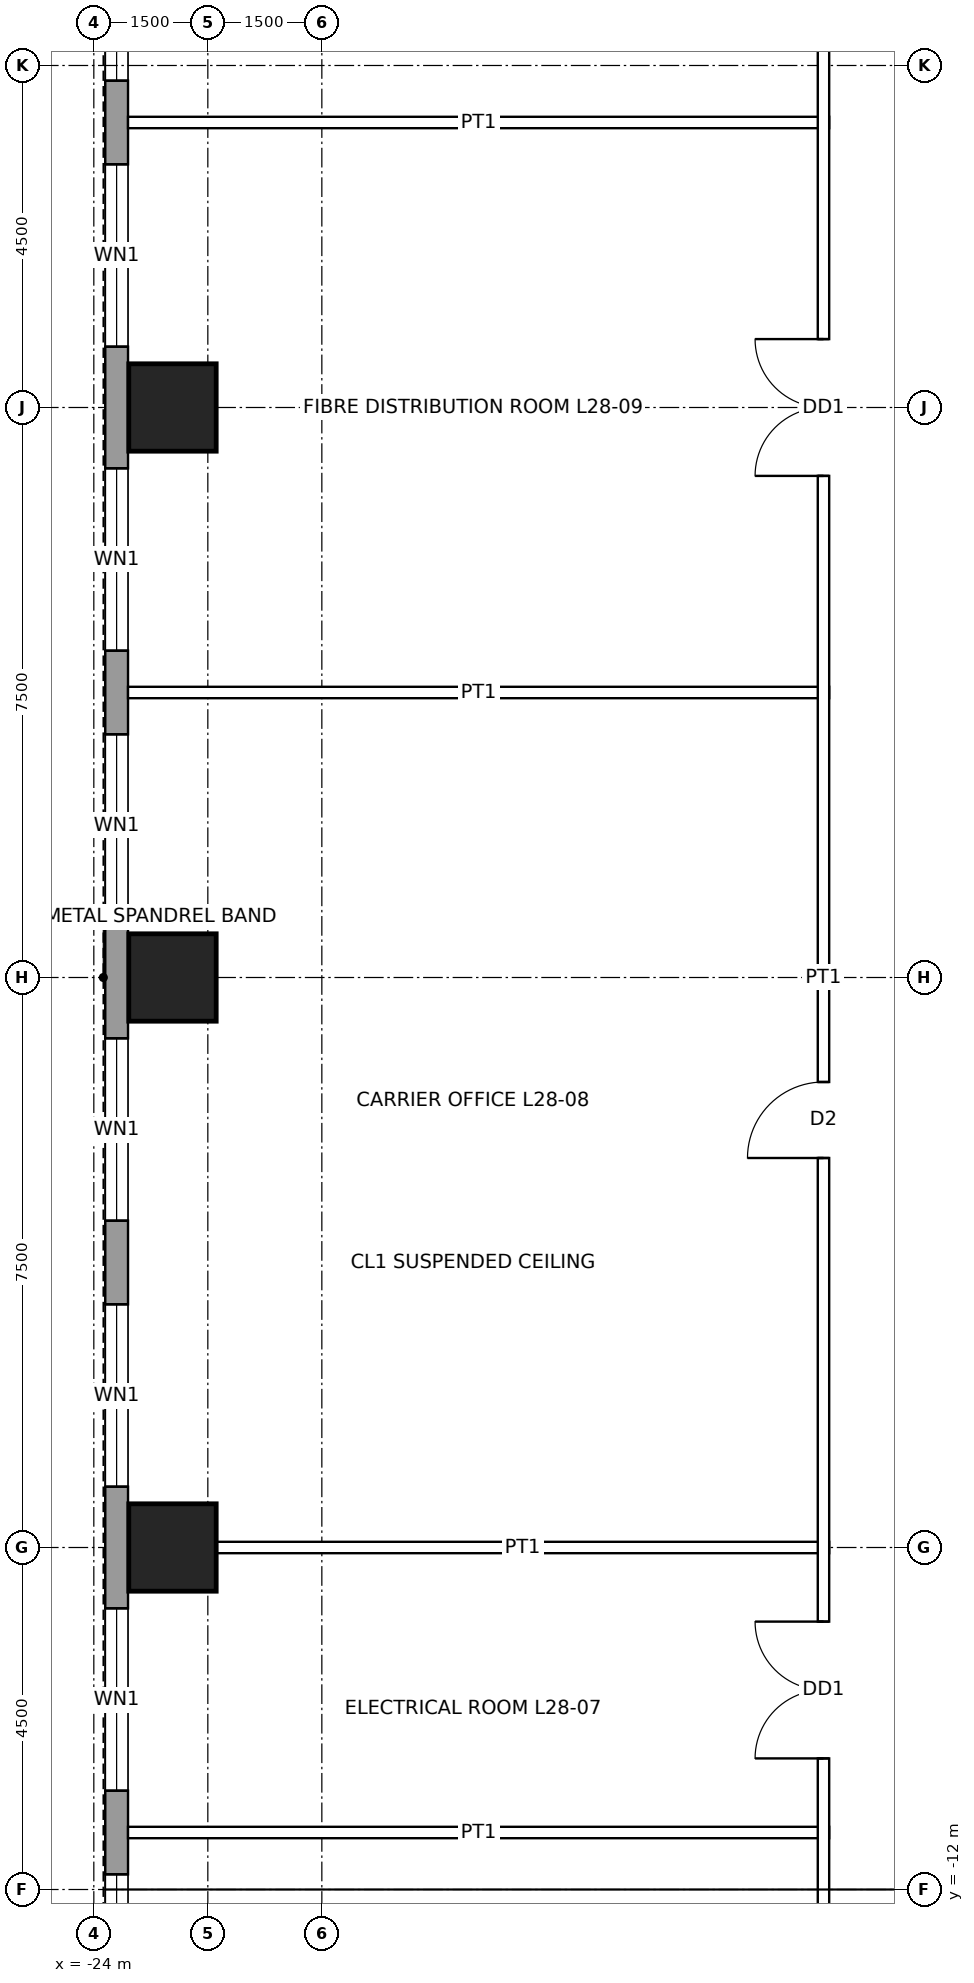
"""IFC4 building model, lengths in metres.
Left out: names, types, materials, properties, quantities, classifications, styles, units other than length and angle.
Written with IfcOpenShell. Run it as: python <this file> out.ifc"""

import sys

from ifc_helpers import new_model, si_unit, direction, frame, frame_2d, origin, origin_2d, place, context, subcontext, project, spatial, rectangle, hollow_rectangle, extrude, element, fill, save


model = new_model("IFC4")
c1 = context("Model", 3, precision=1e-05, world=origin(), true_north=direction((0.0, 1.0)))
c2 = subcontext(c1, "Body", "Model", "MODEL_VIEW")
j1 = project(units=[si_unit("LENGTHUNIT", "METRE"), si_unit("PLANEANGLEUNIT", "RADIAN")], contexts=[c1])
p1 = place(None, origin())
s1 = spatial("IfcSite", under=j1, at=p1, CompositionType="ELEMENT")
p2 = place(p1, origin())
s2 = spatial("IfcBuilding", under=s1, at=p2, CompositionType="ELEMENT")
p3 = place(p2, frame((0.0, 0.0, 140.4)))
s3 = spatial("IfcBuildingStorey", under=s2, at=p3, CompositionType="ELEMENT", Elevation=140.4)
for number, where, z_axis, x_axis in (
    (1, (-22.965, -7.5, 0.0), (0.0, 0.0, 1.0), (1.0, 0.0, 0.0)),
    (2, (-22.965, 0.0, 0.0), (0.0, 0.0, 1.0), (1.0, 0.0, 0.0)),
    (3, (-22.965, 7.5, 0.0), (0.0, 0.0, 1.0), (1.0, 0.0, 0.0)),
):
    element("IfcColumn", number, at=place(p3, frame(where, z_axis=z_axis, x_axis=x_axis)), inside=s3, PredefinedType="COLUMN", context=c2, shape_type="SweptSolid", body=[
        extrude(hollow_rectangle(XDim=1.15, YDim=1.15, WallThickness=0.075, at=origin_2d()), origin(), (0.0, 0.0, 1.0), 4.5),
    ])
p4 = place(p3, frame((-23.7, -16.2, 0.0), z_axis=(0.0, 0.0, 1.0), x_axis=(0.0, 1.0, 0.0)))
e4 = element("IfcWall", 4, at=p4, inside=s3, PredefinedType="SOLIDWALL", context=c2, shape_type="SweptSolid", body=[
    extrude(rectangle(XDim=32.4, YDim=0.3, at=frame_2d((16.2, 0.0))), origin(), (0.0, 0.0, 1.0), 4.3),
])
p5 = place(p4, frame((2.0, 0.0, 1.0)))
e5 = element("IfcOpeningElement", 5, at=p5, cuts=e4, PredefinedType="OPENING", context=c2, shape_type="SweptSolid", body=[
    extrude(rectangle(XDim=2.4, YDim=1.2, at=frame_2d((1.2, 0.6))), frame((0.0, 0.16, 0.0), z_axis=(0.0, -1.0, 0.0), x_axis=(1.0, 0.0, 0.0)), (0.0, 0.0, 1.0), 0.32),
])
p6 = place(p4, frame((5.5, 0.0, 1.0)))
e6 = element("IfcOpeningElement", 6, at=p6, cuts=e4, PredefinedType="OPENING", context=c2, shape_type="SweptSolid", body=[
    extrude(rectangle(XDim=2.4, YDim=1.2, at=frame_2d((1.2, 0.6))), frame((0.0, 0.16, 0.0), z_axis=(0.0, -1.0, 0.0), x_axis=(1.0, 0.0, 0.0)), (0.0, 0.0, 1.0), 0.32),
])
p7 = place(p4, frame((9.5, 0.0, 1.0)))
e7 = element("IfcOpeningElement", 7, at=p7, cuts=e4, PredefinedType="OPENING", context=c2, shape_type="SweptSolid", body=[
    extrude(rectangle(XDim=2.4, YDim=1.2, at=frame_2d((1.2, 0.6))), frame((0.0, 0.16, 0.0), z_axis=(0.0, -1.0, 0.0), x_axis=(1.0, 0.0, 0.0)), (0.0, 0.0, 1.0), 0.32),
])
p8 = place(p4, frame((13.0, 0.0, 1.0)))
e8 = element("IfcOpeningElement", 8, at=p8, cuts=e4, PredefinedType="OPENING", context=c2, shape_type="SweptSolid", body=[
    extrude(rectangle(XDim=2.4, YDim=1.2, at=frame_2d((1.2, 0.6))), frame((0.0, 0.16, 0.0), z_axis=(0.0, -1.0, 0.0), x_axis=(1.0, 0.0, 0.0)), (0.0, 0.0, 1.0), 0.32),
])
p9 = place(p4, frame((17.0, 0.0, 1.0)))
e9 = element("IfcOpeningElement", 9, at=p9, cuts=e4, PredefinedType="OPENING", context=c2, shape_type="SweptSolid", body=[
    extrude(rectangle(XDim=2.4, YDim=1.2, at=frame_2d((1.2, 0.6))), frame((0.0, 0.16, 0.0), z_axis=(0.0, -1.0, 0.0), x_axis=(1.0, 0.0, 0.0)), (0.0, 0.0, 1.0), 0.32),
])
p10 = place(p4, frame((20.5, 0.0, 1.0)))
e10 = element("IfcOpeningElement", 10, at=p10, cuts=e4, PredefinedType="OPENING", context=c2, shape_type="SweptSolid", body=[
    extrude(rectangle(XDim=2.4, YDim=1.2, at=frame_2d((1.2, 0.6))), frame((0.0, 0.16, 0.0), z_axis=(0.0, -1.0, 0.0), x_axis=(1.0, 0.0, 0.0)), (0.0, 0.0, 1.0), 0.32),
])
p11 = place(p4, frame((24.5, 0.0, 1.0)))
e11 = element("IfcOpeningElement", 11, at=p11, cuts=e4, PredefinedType="OPENING", context=c2, shape_type="SweptSolid", body=[
    extrude(rectangle(XDim=2.4, YDim=1.2, at=frame_2d((1.2, 0.6))), frame((0.0, 0.16, 0.0), z_axis=(0.0, -1.0, 0.0), x_axis=(1.0, 0.0, 0.0)), (0.0, 0.0, 1.0), 0.32),
])
p12 = place(p4, frame((28.0, 0.0, 1.0)))
e12 = element("IfcOpeningElement", 12, at=p12, cuts=e4, PredefinedType="OPENING", context=c2, shape_type="SweptSolid", body=[
    extrude(rectangle(XDim=2.4, YDim=1.2, at=frame_2d((1.2, 0.6))), frame((0.0, 0.16, 0.0), z_axis=(0.0, -1.0, 0.0), x_axis=(1.0, 0.0, 0.0)), (0.0, 0.0, 1.0), 0.32),
])
p13 = place(p3, frame((-23.55, -11.25, 0.0), z_axis=(0.0, 0.0, 1.0), x_axis=(1.0, 0.0, 0.0)))
e13 = element("IfcWall", 13, at=p13, inside=s3, PredefinedType="PARTITIONING", context=c2, shape_type="SweptSolid", body=[
    extrude(rectangle(XDim=9.225, YDim=0.15, at=frame_2d((4.613, 0.0))), origin(), (0.0, 0.0, 1.0), 3.431),
])
p14 = place(p3, frame((-22.39, -7.5, 0.0), z_axis=(0.0, 0.0, 1.0), x_axis=(1.0, 0.0, 0.0)))
e14 = element("IfcWall", 14, at=p14, inside=s3, PredefinedType="PARTITIONING", context=c2, shape_type="SweptSolid", body=[
    extrude(rectangle(XDim=8.065, YDim=0.15, at=frame_2d((4.032, 0.0))), origin(), (0.0, 0.0, 1.0), 3.431),
])
for number, where, z_axis, x_axis in (
    (15, (-23.55, 3.75, 0.0), (0.0, 0.0, 1.0), (1.0, 0.0, 0.0)),
    (16, (-23.55, 11.25, 0.0), (0.0, 0.0, 1.0), (1.0, 0.0, 0.0)),
):
    element("IfcWall", number, at=place(p3, frame(where, z_axis=z_axis, x_axis=x_axis)), inside=s3, PredefinedType="PARTITIONING", context=c2, shape_type="SweptSolid", body=[
        extrude(rectangle(XDim=9.225, YDim=0.15, at=frame_2d((4.613, 0.0))), origin(), (0.0, 0.0, 1.0), 3.431),
    ])
p15 = place(p3, frame((-14.4, -14.475, 0.0), z_axis=(0.0, 0.0, 1.0), x_axis=(0.0, 1.0, 0.0)))
e17 = element("IfcWall", 17, at=p15, inside=s3, PredefinedType="PARTITIONING", context=c2, shape_type="SweptSolid", body=[
    extrude(rectangle(XDim=28.95, YDim=0.15, at=frame_2d((14.475, 0.0))), origin(), (0.0, 0.0, 1.0), 4.3),
])
p16 = place(p15, frame((4.2, 0.0, 0.0)))
e18 = element("IfcOpeningElement", 18, at=p16, cuts=e17, PredefinedType="OPENING", context=c2, shape_type="SweptSolid", body=[
    extrude(rectangle(XDim=1.8, YDim=2.4, at=frame_2d((0.9, 1.2))), frame((0.0, 0.085, 0.0), z_axis=(0.0, -1.0, 0.0), x_axis=(1.0, 0.0, 0.0)), (0.0, 0.0, 1.0), 0.17),
])
p17 = place(p15, frame((12.1, 0.0, 0.0)))
e19 = element("IfcOpeningElement", 19, at=p17, cuts=e17, PredefinedType="OPENING", context=c2, shape_type="SweptSolid", body=[
    extrude(rectangle(XDim=1.0, YDim=2.1, at=frame_2d((0.5, 1.05))), frame((0.0, 0.085, 0.0), z_axis=(0.0, -1.0, 0.0), x_axis=(1.0, 0.0, 0.0)), (0.0, 0.0, 1.0), 0.17),
])
p18 = place(p15, frame((21.075, 0.0, 0.0)))
e20 = element("IfcOpeningElement", 20, at=p18, cuts=e17, PredefinedType="OPENING", context=c2, shape_type="SweptSolid", body=[
    extrude(rectangle(XDim=1.8, YDim=2.4, at=frame_2d((0.9, 1.2))), frame((0.0, 0.085, 0.0), z_axis=(0.0, -1.0, 0.0), x_axis=(1.0, 0.0, 0.0)), (0.0, 0.0, 1.0), 0.17),
])
p19 = place(p5, origin())
e21 = element("IfcWindow", 21, at=p19, inside=s3, PartitioningType="SINGLE_PANEL", PredefinedType="WINDOW", context=c2, shape_type="SweptSolid", body=[
    extrude(rectangle(XDim=2.4, YDim=1.2, at=frame_2d((1.2, 0.6))), frame((0.0, 0.03, 0.0), z_axis=(0.0, -1.0, 0.0), x_axis=(1.0, 0.0, 0.0)), (0.0, 0.0, 1.0), 0.06),
])
fill(e5, e21)
p20 = place(p6, origin())
e22 = element("IfcWindow", 22, at=p20, inside=s3, PartitioningType="SINGLE_PANEL", PredefinedType="WINDOW", context=c2, shape_type="SweptSolid", body=[
    extrude(rectangle(XDim=2.4, YDim=1.2, at=frame_2d((1.2, 0.6))), frame((0.0, 0.03, 0.0), z_axis=(0.0, -1.0, 0.0), x_axis=(1.0, 0.0, 0.0)), (0.0, 0.0, 1.0), 0.06),
])
fill(e6, e22)
p21 = place(p7, origin())
e23 = element("IfcWindow", 23, at=p21, inside=s3, PartitioningType="SINGLE_PANEL", PredefinedType="WINDOW", context=c2, shape_type="SweptSolid", body=[
    extrude(rectangle(XDim=2.4, YDim=1.2, at=frame_2d((1.2, 0.6))), frame((0.0, 0.03, 0.0), z_axis=(0.0, -1.0, 0.0), x_axis=(1.0, 0.0, 0.0)), (0.0, 0.0, 1.0), 0.06),
])
fill(e7, e23)
p22 = place(p8, origin())
e24 = element("IfcWindow", 24, at=p22, inside=s3, PartitioningType="SINGLE_PANEL", PredefinedType="WINDOW", context=c2, shape_type="SweptSolid", body=[
    extrude(rectangle(XDim=2.4, YDim=1.2, at=frame_2d((1.2, 0.6))), frame((0.0, 0.03, 0.0), z_axis=(0.0, -1.0, 0.0), x_axis=(1.0, 0.0, 0.0)), (0.0, 0.0, 1.0), 0.06),
])
fill(e8, e24)
p23 = place(p9, origin())
e25 = element("IfcWindow", 25, at=p23, inside=s3, PartitioningType="SINGLE_PANEL", PredefinedType="WINDOW", context=c2, shape_type="SweptSolid", body=[
    extrude(rectangle(XDim=2.4, YDim=1.2, at=frame_2d((1.2, 0.6))), frame((0.0, 0.03, 0.0), z_axis=(0.0, -1.0, 0.0), x_axis=(1.0, 0.0, 0.0)), (0.0, 0.0, 1.0), 0.06),
])
fill(e9, e25)
p24 = place(p10, origin())
e26 = element("IfcWindow", 26, at=p24, inside=s3, PartitioningType="SINGLE_PANEL", PredefinedType="WINDOW", context=c2, shape_type="SweptSolid", body=[
    extrude(rectangle(XDim=2.4, YDim=1.2, at=frame_2d((1.2, 0.6))), frame((0.0, 0.03, 0.0), z_axis=(0.0, -1.0, 0.0), x_axis=(1.0, 0.0, 0.0)), (0.0, 0.0, 1.0), 0.06),
])
fill(e10, e26)
p25 = place(p11, origin())
e27 = element("IfcWindow", 27, at=p25, inside=s3, PartitioningType="SINGLE_PANEL", PredefinedType="WINDOW", context=c2, shape_type="SweptSolid", body=[
    extrude(rectangle(XDim=2.4, YDim=1.2, at=frame_2d((1.2, 0.6))), frame((0.0, 0.03, 0.0), z_axis=(0.0, -1.0, 0.0), x_axis=(1.0, 0.0, 0.0)), (0.0, 0.0, 1.0), 0.06),
])
fill(e11, e27)
p26 = place(p12, origin())
e28 = element("IfcWindow", 28, at=p26, inside=s3, PartitioningType="SINGLE_PANEL", PredefinedType="WINDOW", context=c2, shape_type="SweptSolid", body=[
    extrude(rectangle(XDim=2.4, YDim=1.2, at=frame_2d((1.2, 0.6))), frame((0.0, 0.03, 0.0), z_axis=(0.0, -1.0, 0.0), x_axis=(1.0, 0.0, 0.0)), (0.0, 0.0, 1.0), 0.06),
])
fill(e12, e28)
p27 = place(p16, origin())
e29 = element("IfcDoor", 29, at=p27, inside=s3, OperationType="DOUBLE_DOOR_SINGLE_SWING", PredefinedType="DOOR", context=c2, shape_type="SweptSolid", body=[
    extrude(rectangle(XDim=1.8, YDim=2.4, at=frame_2d((0.9, 1.2))), frame((0.0, 0.025, 0.0), z_axis=(0.0, -1.0, 0.0), x_axis=(1.0, 0.0, 0.0)), (0.0, 0.0, 1.0), 0.05),
])
fill(e18, e29)
p28 = place(p17, origin())
e30 = element("IfcDoor", 30, at=p28, inside=s3, OperationType="SINGLE_SWING_LEFT", PredefinedType="DOOR", context=c2, shape_type="SweptSolid", body=[
    extrude(rectangle(XDim=1.0, YDim=2.1, at=frame_2d((0.5, 1.05))), frame((0.0, 0.025, 0.0), z_axis=(0.0, -1.0, 0.0), x_axis=(1.0, 0.0, 0.0)), (0.0, 0.0, 1.0), 0.05),
])
fill(e19, e30)
p29 = place(p18, origin())
e31 = element("IfcDoor", 31, at=p29, inside=s3, OperationType="DOUBLE_DOOR_SINGLE_SWING", PredefinedType="DOOR", context=c2, shape_type="SweptSolid", body=[
    extrude(rectangle(XDim=1.8, YDim=2.4, at=frame_2d((0.9, 1.2))), frame((0.0, 0.025, 0.0), z_axis=(0.0, -1.0, 0.0), x_axis=(1.0, 0.0, 0.0)), (0.0, 0.0, 1.0), 0.05),
])
fill(e20, e31)
save(model, sys.argv[1])
